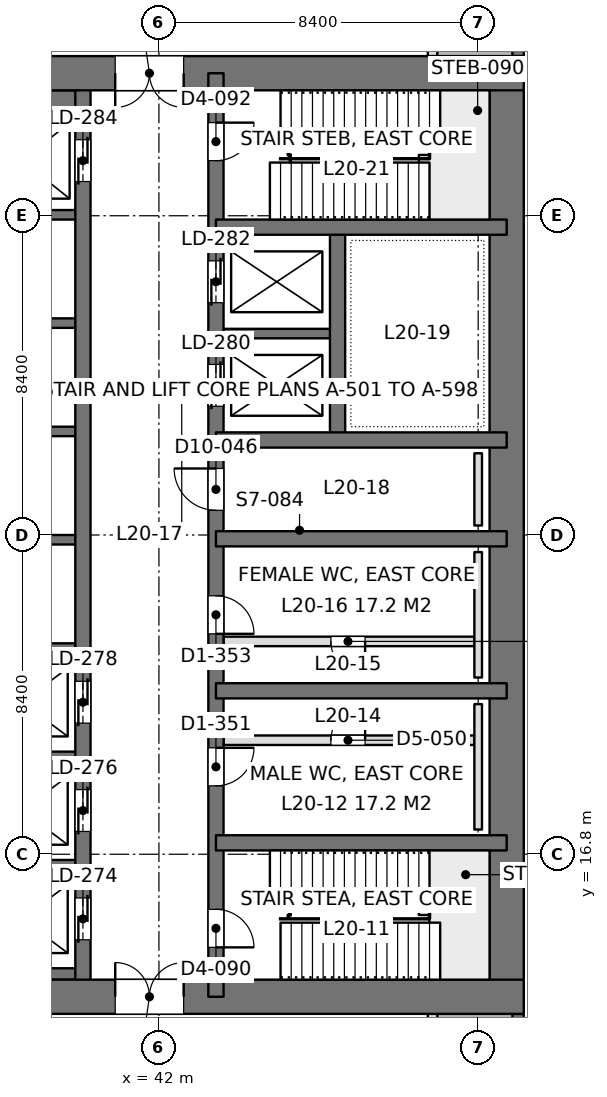
"""IFC4 building model, lengths in metres.
Left out: names, types, materials, properties, quantities, classifications, styles, units other than length and angle.
Written with IfcOpenShell. Run it as: python <this file> out.ifc"""

import sys

from ifc_helpers import new_model, si_unit, direction, frame, frame_2d, origin, place, context, subcontext, project, spatial, rectangle, extrude, element, fill, save


model = new_model("IFC4")
c1 = context("Model", 3, precision=1e-05, world=origin(), true_north=direction((0.0, 1.0)))
c2 = subcontext(c1, "Body", "Model", "MODEL_VIEW")
j1 = project(units=[si_unit("LENGTHUNIT", "METRE"), si_unit("PLANEANGLEUNIT", "RADIAN")], contexts=[c1])
p1 = place(None, origin())
s1 = spatial("IfcSite", under=j1, at=p1, CompositionType="ELEMENT")
p2 = place(p1, origin())
s2 = spatial("IfcBuilding", under=s1, at=p2, CompositionType="ELEMENT")
p3 = place(p2, frame((0.0, 0.0, 90.9)))
s3 = spatial("IfcBuildingStorey", under=s2, at=p3, CompositionType="ELEMENT", Elevation=90.9)
p4 = place(p3, frame((33.6, 13.05, 0.0), z_axis=(0.0, 0.0, 1.0), x_axis=(1.0, 0.0, 0.0)))
e1 = element("IfcWall", 1, at=p4, inside=s3, PredefinedType="SHEAR", context=c2, shape_type="SweptSolid", body=[
    extrude(rectangle(XDim=18.0, YDim=0.9, at=frame_2d((9.0, 0.0))), origin(), (0.0, 0.0, 1.0), 5.4),
])
p5 = place(p4, frame((7.25, 0.0, 0.0)))
e2 = element("IfcOpeningElement", 2, at=p5, cuts=e1, PredefinedType="OPENING", context=c2, shape_type="SweptSolid", body=[
    extrude(rectangle(XDim=1.8, YDim=2.4, at=frame_2d((0.9, 1.2))), frame((0.0, 0.46, 0.0), z_axis=(0.0, -1.0, 0.0), x_axis=(1.0, 0.0, 0.0)), (0.0, 0.0, 1.0), 0.92),
])
p6 = place(p3, frame((33.6, 37.35, 0.0), z_axis=(0.0, 0.0, 1.0), x_axis=(1.0, 0.0, 0.0)))
e3 = element("IfcWall", 3, at=p6, inside=s3, PredefinedType="SHEAR", context=c2, shape_type="SweptSolid", body=[
    extrude(rectangle(XDim=18.0, YDim=0.9, at=frame_2d((9.0, 0.0))), origin(), (0.0, 0.0, 1.0), 5.4),
])
p7 = place(p6, frame((7.25, 0.0, 0.0)))
e4 = element("IfcOpeningElement", 4, at=p7, cuts=e3, PredefinedType="OPENING", context=c2, shape_type="SweptSolid", body=[
    extrude(rectangle(XDim=1.8, YDim=2.4, at=frame_2d((0.9, 1.2))), frame((0.0, 0.46, 0.0), z_axis=(0.0, -1.0, 0.0), x_axis=(1.0, 0.0, 0.0)), (0.0, 0.0, 1.0), 0.92),
])
p8 = place(p3, frame((51.15, 13.05, 0.0), z_axis=(0.0, 0.0, 1.0), x_axis=(0.0, 1.0, 0.0)))
e5 = element("IfcWall", 5, at=p8, inside=s3, PredefinedType="SHEAR", context=c2, shape_type="SweptSolid", body=[
    extrude(rectangle(XDim=24.3, YDim=0.9, at=frame_2d((12.15, 0.0))), origin(), (0.0, 0.0, 1.0), 5.4),
])
p9 = place(p3, frame((43.5, 13.05, 0.0), z_axis=(0.0, 0.0, 1.0), x_axis=(0.0, 1.0, 0.0)))
e6 = element("IfcWall", 6, at=p9, inside=s3, PredefinedType="SHEAR", context=c2, shape_type="SweptSolid", body=[
    extrude(rectangle(XDim=24.3, YDim=0.4, at=frame_2d((12.15, 0.0))), origin(), (0.0, 0.0, 1.0), 5.4),
])
p10 = place(p9, frame((1.3, 0.0, 0.0)))
e7 = element("IfcOpeningElement", 7, at=p10, cuts=e6, PredefinedType="OPENING", context=c2, shape_type="SweptSolid", body=[
    extrude(rectangle(XDim=1.0, YDim=2.2, at=frame_2d((0.5, 1.1))), frame((0.0, 0.21, 0.0), z_axis=(0.0, -1.0, 0.0), x_axis=(1.0, 0.0, 0.0)), (0.0, 0.0, 1.0), 0.42),
])
p11 = place(p9, frame((22.0, 0.0, 0.0)))
e8 = element("IfcOpeningElement", 8, at=p11, cuts=e6, PredefinedType="OPENING", context=c2, shape_type="SweptSolid", body=[
    extrude(rectangle(XDim=1.0, YDim=2.2, at=frame_2d((0.5, 1.1))), frame((0.0, 0.21, 0.0), z_axis=(0.0, -1.0, 0.0), x_axis=(1.0, 0.0, 0.0)), (0.0, 0.0, 1.0), 0.42),
])
p12 = place(p9, frame((5.55, 0.0, 0.0)))
e9 = element("IfcOpeningElement", 9, at=p12, cuts=e6, PredefinedType="OPENING", context=c2, shape_type="SweptSolid", body=[
    extrude(rectangle(XDim=1.0, YDim=2.2, at=frame_2d((0.5, 1.1))), frame((0.0, 0.21, 0.0), z_axis=(0.0, -1.0, 0.0), x_axis=(1.0, 0.0, 0.0)), (0.0, 0.0, 1.0), 0.42),
])
p13 = place(p9, frame((9.55, 0.0, 0.0)))
e10 = element("IfcOpeningElement", 10, at=p13, cuts=e6, PredefinedType="OPENING", context=c2, shape_type="SweptSolid", body=[
    extrude(rectangle(XDim=1.0, YDim=2.2, at=frame_2d((0.5, 1.1))), frame((0.0, 0.21, 0.0), z_axis=(0.0, -1.0, 0.0), x_axis=(1.0, 0.0, 0.0)), (0.0, 0.0, 1.0), 0.42),
])
p14 = place(p9, frame((12.8, 0.0, 0.0)))
e11 = element("IfcOpeningElement", 11, at=p14, cuts=e6, PredefinedType="OPENING", context=c2, shape_type="SweptSolid", body=[
    extrude(rectangle(XDim=1.1, YDim=2.2, at=frame_2d((0.55, 1.1))), frame((0.0, 0.21, 0.0), z_axis=(0.0, -1.0, 0.0), x_axis=(1.0, 0.0, 0.0)), (0.0, 0.0, 1.0), 0.42),
])
p15 = place(p9, frame((15.538, 0.0, 0.0)))
e12 = element("IfcOpeningElement", 12, at=p15, cuts=e6, PredefinedType="OPENING", context=c2, shape_type="SweptSolid", body=[
    extrude(rectangle(XDim=1.1, YDim=2.2, at=frame_2d((0.55, 1.1))), frame((0.0, 0.21, 0.0), z_axis=(0.0, -1.0, 0.0), x_axis=(1.0, 0.0, 0.0)), (0.0, 0.0, 1.0), 0.42),
])
p16 = place(p9, frame((18.262, 0.0, 0.0)))
e13 = element("IfcOpeningElement", 13, at=p16, cuts=e6, PredefinedType="OPENING", context=c2, shape_type="SweptSolid", body=[
    extrude(rectangle(XDim=1.1, YDim=2.2, at=frame_2d((0.55, 1.1))), frame((0.0, 0.21, 0.0), z_axis=(0.0, -1.0, 0.0), x_axis=(1.0, 0.0, 0.0)), (0.0, 0.0, 1.0), 0.42),
])
p17 = place(p3, frame((40.0, 13.05, 0.0), z_axis=(0.0, 0.0, 1.0), x_axis=(0.0, 1.0, 0.0)))
e14 = element("IfcWall", 14, at=p17, inside=s3, PredefinedType="SHEAR", context=c2, shape_type="SweptSolid", body=[
    extrude(rectangle(XDim=24.3, YDim=0.4, at=frame_2d((12.15, 0.0))), origin(), (0.0, 0.0, 1.0), 5.4),
])
p18 = place(p17, frame((1.5, 0.0, 0.0)))
e15 = element("IfcOpeningElement", 15, at=p18, cuts=e14, PredefinedType="OPENING", context=c2, shape_type="SweptSolid", body=[
    extrude(rectangle(XDim=1.1, YDim=2.2, at=frame_2d((0.55, 1.1))), frame((0.0, 0.21, 0.0), z_axis=(0.0, -1.0, 0.0), x_axis=(1.0, 0.0, 0.0)), (0.0, 0.0, 1.0), 0.42),
])
p19 = place(p17, frame((4.35, 0.0, 0.0)))
e16 = element("IfcOpeningElement", 16, at=p19, cuts=e14, PredefinedType="OPENING", context=c2, shape_type="SweptSolid", body=[
    extrude(rectangle(XDim=1.1, YDim=2.2, at=frame_2d((0.55, 1.1))), frame((0.0, 0.21, 0.0), z_axis=(0.0, -1.0, 0.0), x_axis=(1.0, 0.0, 0.0)), (0.0, 0.0, 1.0), 0.42),
])
p20 = place(p17, frame((7.2, 0.0, 0.0)))
e17 = element("IfcOpeningElement", 17, at=p20, cuts=e14, PredefinedType="OPENING", context=c2, shape_type="SweptSolid", body=[
    extrude(rectangle(XDim=1.1, YDim=2.2, at=frame_2d((0.55, 1.1))), frame((0.0, 0.21, 0.0), z_axis=(0.0, -1.0, 0.0), x_axis=(1.0, 0.0, 0.0)), (0.0, 0.0, 1.0), 0.42),
])
p21 = place(p17, frame((21.45, 0.0, 0.0)))
e18 = element("IfcOpeningElement", 18, at=p21, cuts=e14, PredefinedType="OPENING", context=c2, shape_type="SweptSolid", body=[
    extrude(rectangle(XDim=1.1, YDim=2.2, at=frame_2d((0.55, 1.1))), frame((0.0, 0.21, 0.0), z_axis=(0.0, -1.0, 0.0), x_axis=(1.0, 0.0, 0.0)), (0.0, 0.0, 1.0), 0.42),
])
for number, where, z_axis, x_axis in (
    (19, (51.15, 17.1, 0.0), (0.0, 0.0, 1.0), (-1.0, 0.0, 0.0)),
    (20, (51.15, 21.1, 0.0), (0.0, 0.0, 1.0), (-1.0, 0.0, 0.0)),
    (21, (51.15, 25.1, 0.0), (0.0, 0.0, 1.0), (-1.0, 0.0, 0.0)),
    (22, (51.15, 27.7, 0.0), (0.0, 0.0, 1.0), (-1.0, 0.0, 0.0)),
    (23, (51.15, 33.3, 0.0), (0.0, 0.0, 1.0), (-1.0, 0.0, 0.0)),
):
    element("IfcWall", number, at=place(p3, frame(where, z_axis=z_axis, x_axis=x_axis)), inside=s3, PredefinedType="SHEAR", context=c2, shape_type="SweptSolid", body=[
        extrude(rectangle(XDim=7.65, YDim=0.4, at=frame_2d((3.825, 0.0))), origin(), (0.0, 0.0, 1.0), 5.4),
    ])
p22 = place(p3, frame((46.7, 27.7, 0.0), z_axis=(0.0, 0.0, 1.0), x_axis=(0.0, 1.0, 0.0)))
e24 = element("IfcWall", 24, at=p22, inside=s3, PredefinedType="SHEAR", context=c2, shape_type="SweptSolid", body=[
    extrude(rectangle(XDim=5.6, YDim=0.4, at=frame_2d((2.8, 0.0))), origin(), (0.0, 0.0, 1.0), 5.4),
])
p23 = place(p3, frame((46.7, 30.5, 0.0), z_axis=(0.0, 0.0, 1.0), x_axis=(-1.0, 0.0, 0.0)))
e25 = element("IfcWall", 25, at=p23, inside=s3, PredefinedType="SHEAR", context=c2, shape_type="SweptSolid", body=[
    extrude(rectangle(XDim=3.2, YDim=0.25, at=frame_2d((1.6, 0.0))), origin(), (0.0, 0.0, 1.0), 5.4),
])
p24 = place(p3, frame((40.0, 13.65, 0.0), z_axis=(0.0, 0.0, 1.0), x_axis=(-1.0, 0.0, 0.0)))
e26 = element("IfcWall", 26, at=p24, inside=s3, PredefinedType="SHEAR", context=c2, shape_type="SweptSolid", body=[
    extrude(rectangle(XDim=3.2, YDim=0.3, at=frame_2d((1.6, 0.0))), origin(), (0.0, 0.0, 1.0), 5.4),
])
for number, where, z_axis, x_axis in (
    (27, (40.0, 16.525, 0.0), (0.0, 0.0, 1.0), (-1.0, 0.0, 0.0)),
    (28, (40.0, 19.375, 0.0), (0.0, 0.0, 1.0), (-1.0, 0.0, 0.0)),
    (29, (40.0, 22.225, 0.0), (0.0, 0.0, 1.0), (-1.0, 0.0, 0.0)),
    (30, (40.0, 25.075, 0.0), (0.0, 0.0, 1.0), (-1.0, 0.0, 0.0)),
    (31, (40.0, 27.925, 0.0), (0.0, 0.0, 1.0), (-1.0, 0.0, 0.0)),
    (32, (40.0, 30.775, 0.0), (0.0, 0.0, 1.0), (-1.0, 0.0, 0.0)),
    (33, (40.0, 33.625, 0.0), (0.0, 0.0, 1.0), (-1.0, 0.0, 0.0)),
):
    element("IfcWall", number, at=place(p3, frame(where, z_axis=z_axis, x_axis=x_axis)), inside=s3, PredefinedType="SHEAR", context=c2, shape_type="SweptSolid", body=[
        extrude(rectangle(XDim=3.2, YDim=0.25, at=frame_2d((1.6, 0.0))), origin(), (0.0, 0.0, 1.0), 5.4),
    ])
p25 = place(p3, frame((40.0, 36.625, 0.0), z_axis=(0.0, 0.0, 1.0), x_axis=(-1.0, 0.0, 0.0)))
e34 = element("IfcWall", 34, at=p25, inside=s3, PredefinedType="SHEAR", context=c2, shape_type="SweptSolid", body=[
    extrude(rectangle(XDim=3.2, YDim=0.55, at=frame_2d((1.6, 0.0))), origin(), (0.0, 0.0, 1.0), 5.4),
])
p26 = place(p3, frame((51.45, 42.0, 0.0), z_axis=(0.0, 0.0, 1.0), x_axis=(0.0, -1.0, 0.0)))
e35 = element("IfcWall", 35, at=p26, inside=s3, PredefinedType="SOLIDWALL", context=c2, shape_type="SweptSolid", body=[
    extrude(rectangle(XDim=4.2, YDim=0.3, at=frame_2d((2.1, 0.0))), origin(), (0.0, 0.0, 1.0), 5.24),
])
p27 = place(p26, frame((0.9, 0.0, 1.2)))
e36 = element("IfcOpeningElement", 36, at=p27, cuts=e35, PredefinedType="OPENING", context=c2, shape_type="SweptSolid", body=[
    extrude(rectangle(XDim=2.4, YDim=2.4, at=frame_2d((1.2, 1.2))), frame((0.0, 0.16, 0.0), z_axis=(0.0, -1.0, 0.0), x_axis=(1.0, 0.0, 0.0)), (0.0, 0.0, 1.0), 0.32),
])
p28 = place(p3, frame((51.45, 12.6, 0.0), z_axis=(0.0, 0.0, 1.0), x_axis=(0.0, -1.0, 0.0)))
e37 = element("IfcWall", 37, at=p28, inside=s3, PredefinedType="SOLIDWALL", context=c2, shape_type="SweptSolid", body=[
    extrude(rectangle(XDim=4.2, YDim=0.3, at=frame_2d((2.1, 0.0))), origin(), (0.0, 0.0, 1.0), 5.24),
])
p29 = place(p28, frame((0.9, 0.0, 1.2)))
e38 = element("IfcOpeningElement", 38, at=p29, cuts=e37, PredefinedType="OPENING", context=c2, shape_type="SweptSolid", body=[
    extrude(rectangle(XDim=2.4, YDim=2.4, at=frame_2d((1.2, 1.2))), frame((0.0, 0.16, 0.0), z_axis=(0.0, -1.0, 0.0), x_axis=(1.0, 0.0, 0.0)), (0.0, 0.0, 1.0), 0.32),
])
p30 = place(p3, frame((49.2, 10.8, 0.0), z_axis=(0.0, 0.0, 1.0), x_axis=(0.0, 1.0, 0.0)))
e39 = element("IfcWall", 39, at=p30, inside=s3, PredefinedType="PARTITIONING", context=c2, shape_type="SweptSolid", body=[
    extrude(rectangle(XDim=1.802, YDim=0.25, at=frame_2d((0.901, 0.0))), origin(), (0.0, 0.0, 1.0), 5.24),
])
p31 = place(p3, frame((49.2, 37.8, 0.0), z_axis=(0.0, 0.0, 1.0), x_axis=(0.0, 1.0, 0.0)))
e40 = element("IfcWall", 40, at=p31, inside=s3, PredefinedType="PARTITIONING", context=c2, shape_type="SweptSolid", body=[
    extrude(rectangle(XDim=1.8, YDim=0.25, at=frame_2d((0.9, 0.0))), origin(), (0.0, 0.0, 1.0), 5.24),
])
p32 = place(p3, frame((43.7, 22.4, 0.0), z_axis=(0.0, 0.0, 1.0), x_axis=(1.0, 0.0, 0.0)))
e41 = element("IfcWall", 41, at=p32, inside=s3, PredefinedType="PARTITIONING", context=c2, shape_type="SweptSolid", body=[
    extrude(rectangle(XDim=6.6, YDim=0.25, at=frame_2d((3.3, 0.0))), origin(), (0.0, 0.0, 1.0), 5.2),
])
p33 = place(p32, frame((2.825, 0.0, 0.0)))
e42 = element("IfcOpeningElement", 42, at=p33, cuts=e41, PredefinedType="OPENING", context=c2, shape_type="SweptSolid", body=[
    extrude(rectangle(XDim=0.9, YDim=2.2, at=frame_2d((0.45, 1.1))), frame((0.0, 0.135, 0.0), z_axis=(0.0, -1.0, 0.0), x_axis=(1.0, 0.0, 0.0)), (0.0, 0.0, 1.0), 0.27),
])
p34 = place(p3, frame((43.7, 19.8, 0.0), z_axis=(0.0, 0.0, 1.0), x_axis=(1.0, 0.0, 0.0)))
e43 = element("IfcWall", 43, at=p34, inside=s3, PredefinedType="PARTITIONING", context=c2, shape_type="SweptSolid", body=[
    extrude(rectangle(XDim=6.6, YDim=0.25, at=frame_2d((3.3, 0.0))), origin(), (0.0, 0.0, 1.0), 5.2),
])
p35 = place(p34, frame((2.825, 0.0, 0.0)))
e44 = element("IfcOpeningElement", 44, at=p35, cuts=e43, PredefinedType="OPENING", context=c2, shape_type="SweptSolid", body=[
    extrude(rectangle(XDim=0.9, YDim=2.2, at=frame_2d((0.45, 1.1))), frame((0.0, 0.135, 0.0), z_axis=(0.0, -1.0, 0.0), x_axis=(1.0, 0.0, 0.0)), (0.0, 0.0, 1.0), 0.27),
])
for number, where, z_axis, x_axis in (
    (45, (50.4, 17.45, 0.0), (0.0, 0.0, 1.0), (0.0, 1.0, 0.0)),
    (46, (50.4, 21.45, 0.0), (0.0, 0.0, 1.0), (0.0, 1.0, 0.0)),
):
    element("IfcWall", number, at=place(p3, frame(where, z_axis=z_axis, x_axis=x_axis)), inside=s3, PredefinedType="PLUMBINGWALL", context=c2, shape_type="SweptSolid", body=[
        extrude(rectangle(XDim=3.3, YDim=0.2, at=frame_2d((1.65, 0.0))), origin(), (0.0, 0.0, 1.0), 1.2),
    ])
p36 = place(p3, frame((50.4, 25.45, 0.0), z_axis=(0.0, 0.0, 1.0), x_axis=(0.0, 1.0, 0.0)))
e47 = element("IfcWall", 47, at=p36, inside=s3, PredefinedType="PLUMBINGWALL", context=c2, shape_type="SweptSolid", body=[
    extrude(rectangle(XDim=1.9, YDim=0.2, at=frame_2d((0.95, 0.0))), origin(), (0.0, 0.0, 1.0), 1.2),
])
p37 = place(p5, origin())
e48 = element("IfcDoor", 48, at=p37, inside=s3, OperationType="DOUBLE_DOOR_SINGLE_SWING", PredefinedType="DOOR", context=c2, shape_type="SweptSolid", body=[
    extrude(rectangle(XDim=1.8, YDim=2.4, at=frame_2d((0.9, 1.2))), frame((0.0, 0.025, 0.0), z_axis=(0.0, -1.0, 0.0), x_axis=(1.0, 0.0, 0.0)), (0.0, 0.0, 1.0), 0.05),
])
fill(e2, e48)
p38 = place(p7, frame((1.8, 0.0, 0.0), z_axis=(0.0, 0.0, 1.0), x_axis=(-1.0, 0.0, 0.0)))
e49 = element("IfcDoor", 49, at=p38, inside=s3, OperationType="DOUBLE_DOOR_SINGLE_SWING", PredefinedType="DOOR", context=c2, shape_type="SweptSolid", body=[
    extrude(rectangle(XDim=1.8, YDim=2.4, at=frame_2d((0.9, 1.2))), frame((0.0, 0.025, 0.0), z_axis=(0.0, -1.0, 0.0), x_axis=(1.0, 0.0, 0.0)), (0.0, 0.0, 1.0), 0.05),
])
fill(e4, e49)
p39 = place(p10, frame((1.0, 0.0, 0.0), z_axis=(0.0, 0.0, 1.0), x_axis=(-1.0, 0.0, 0.0)))
e50 = element("IfcDoor", 50, at=p39, inside=s3, OperationType="SINGLE_SWING_RIGHT", PredefinedType="DOOR", context=c2, shape_type="SweptSolid", body=[
    extrude(rectangle(XDim=1.0, YDim=2.2, at=frame_2d((0.5, 1.1))), frame((0.0, 0.025, 0.0), z_axis=(0.0, -1.0, 0.0), x_axis=(1.0, 0.0, 0.0)), (0.0, 0.0, 1.0), 0.05),
])
fill(e7, e50)
p40 = place(p11, frame((1.0, 0.0, 0.0), z_axis=(0.0, 0.0, 1.0), x_axis=(-1.0, 0.0, 0.0)))
e51 = element("IfcDoor", 51, at=p40, inside=s3, OperationType="SINGLE_SWING_LEFT", PredefinedType="DOOR", context=c2, shape_type="SweptSolid", body=[
    extrude(rectangle(XDim=1.0, YDim=2.2, at=frame_2d((0.5, 1.1))), frame((0.0, 0.025, 0.0), z_axis=(0.0, -1.0, 0.0), x_axis=(1.0, 0.0, 0.0)), (0.0, 0.0, 1.0), 0.05),
])
fill(e8, e51)
p41 = place(p12, frame((1.0, 0.0, 0.0), z_axis=(0.0, 0.0, 1.0), x_axis=(-1.0, 0.0, 0.0)))
e52 = element("IfcDoor", 52, at=p41, inside=s3, OperationType="SINGLE_SWING_LEFT", PredefinedType="DOOR", context=c2, shape_type="SweptSolid", body=[
    extrude(rectangle(XDim=1.0, YDim=2.2, at=frame_2d((0.5, 1.1))), frame((0.0, 0.025, 0.0), z_axis=(0.0, -1.0, 0.0), x_axis=(1.0, 0.0, 0.0)), (0.0, 0.0, 1.0), 0.05),
])
fill(e9, e52)
p42 = place(p13, frame((1.0, 0.0, 0.0), z_axis=(0.0, 0.0, 1.0), x_axis=(-1.0, 0.0, 0.0)))
e53 = element("IfcDoor", 53, at=p42, inside=s3, OperationType="SINGLE_SWING_RIGHT", PredefinedType="DOOR", context=c2, shape_type="SweptSolid", body=[
    extrude(rectangle(XDim=1.0, YDim=2.2, at=frame_2d((0.5, 1.1))), frame((0.0, 0.025, 0.0), z_axis=(0.0, -1.0, 0.0), x_axis=(1.0, 0.0, 0.0)), (0.0, 0.0, 1.0), 0.05),
])
fill(e10, e53)
p43 = place(p14, origin())
e54 = element("IfcDoor", 54, at=p43, inside=s3, OperationType="SINGLE_SWING_RIGHT", PredefinedType="DOOR", context=c2, shape_type="SweptSolid", body=[
    extrude(rectangle(XDim=1.1, YDim=2.2, at=frame_2d((0.55, 1.1))), frame((0.0, 0.025, 0.0), z_axis=(0.0, -1.0, 0.0), x_axis=(1.0, 0.0, 0.0)), (0.0, 0.0, 1.0), 0.05),
])
fill(e11, e54)
p44 = place(p18, origin())
e55 = element("IfcDoor", 55, at=p44, inside=s3, OperationType="DOUBLE_DOOR_SLIDING", PredefinedType="DOOR", context=c2, shape_type="SweptSolid", body=[
    extrude(rectangle(XDim=1.1, YDim=2.2, at=frame_2d((0.55, 1.1))), frame((0.0, 0.025, 0.0), z_axis=(0.0, -1.0, 0.0), x_axis=(1.0, 0.0, 0.0)), (0.0, 0.0, 1.0), 0.05),
])
fill(e15, e55)
p45 = place(p19, origin())
e56 = element("IfcDoor", 56, at=p45, inside=s3, OperationType="DOUBLE_DOOR_SLIDING", PredefinedType="DOOR", context=c2, shape_type="SweptSolid", body=[
    extrude(rectangle(XDim=1.1, YDim=2.2, at=frame_2d((0.55, 1.1))), frame((0.0, 0.025, 0.0), z_axis=(0.0, -1.0, 0.0), x_axis=(1.0, 0.0, 0.0)), (0.0, 0.0, 1.0), 0.05),
])
fill(e16, e56)
p46 = place(p20, origin())
e57 = element("IfcDoor", 57, at=p46, inside=s3, OperationType="DOUBLE_DOOR_SLIDING", PredefinedType="DOOR", context=c2, shape_type="SweptSolid", body=[
    extrude(rectangle(XDim=1.1, YDim=2.2, at=frame_2d((0.55, 1.1))), frame((0.0, 0.025, 0.0), z_axis=(0.0, -1.0, 0.0), x_axis=(1.0, 0.0, 0.0)), (0.0, 0.0, 1.0), 0.05),
])
fill(e17, e57)
p47 = place(p21, origin())
e58 = element("IfcDoor", 58, at=p47, inside=s3, OperationType="DOUBLE_DOOR_SLIDING", PredefinedType="DOOR", context=c2, shape_type="SweptSolid", body=[
    extrude(rectangle(XDim=1.1, YDim=2.2, at=frame_2d((0.55, 1.1))), frame((0.0, 0.025, 0.0), z_axis=(0.0, -1.0, 0.0), x_axis=(1.0, 0.0, 0.0)), (0.0, 0.0, 1.0), 0.05),
])
fill(e18, e58)
p48 = place(p15, origin())
e59 = element("IfcDoor", 59, at=p48, inside=s3, OperationType="DOUBLE_DOOR_SLIDING", PredefinedType="DOOR", context=c2, shape_type="SweptSolid", body=[
    extrude(rectangle(XDim=1.1, YDim=2.2, at=frame_2d((0.55, 1.1))), frame((0.0, 0.025, 0.0), z_axis=(0.0, -1.0, 0.0), x_axis=(1.0, 0.0, 0.0)), (0.0, 0.0, 1.0), 0.05),
])
fill(e12, e59)
p49 = place(p16, origin())
e60 = element("IfcDoor", 60, at=p49, inside=s3, OperationType="DOUBLE_DOOR_SLIDING", PredefinedType="DOOR", context=c2, shape_type="SweptSolid", body=[
    extrude(rectangle(XDim=1.1, YDim=2.2, at=frame_2d((0.55, 1.1))), frame((0.0, 0.025, 0.0), z_axis=(0.0, -1.0, 0.0), x_axis=(1.0, 0.0, 0.0)), (0.0, 0.0, 1.0), 0.05),
])
fill(e13, e60)
p50 = place(p33, frame((0.9, 0.0, 0.0), z_axis=(0.0, 0.0, 1.0), x_axis=(-1.0, 0.0, 0.0)))
e61 = element("IfcDoor", 61, at=p50, inside=s3, OperationType="SINGLE_SWING_LEFT", PredefinedType="DOOR", context=c2, shape_type="SweptSolid", body=[
    extrude(rectangle(XDim=0.9, YDim=2.2, at=frame_2d((0.45, 1.1))), frame((0.0, 0.025, 0.0), z_axis=(0.0, -1.0, 0.0), x_axis=(1.0, 0.0, 0.0)), (0.0, 0.0, 1.0), 0.05),
])
fill(e42, e61)
p51 = place(p35, origin())
e62 = element("IfcDoor", 62, at=p51, inside=s3, OperationType="SINGLE_SWING_RIGHT", PredefinedType="DOOR", context=c2, shape_type="SweptSolid", body=[
    extrude(rectangle(XDim=0.9, YDim=2.2, at=frame_2d((0.45, 1.1))), frame((0.0, 0.025, 0.0), z_axis=(0.0, -1.0, 0.0), x_axis=(1.0, 0.0, 0.0)), (0.0, 0.0, 1.0), 0.05),
])
fill(e44, e62)
save(model, sys.argv[1])
